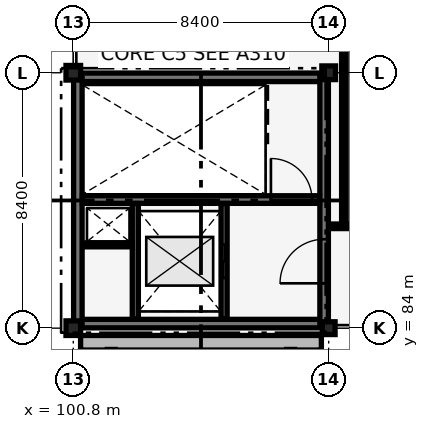
"""IFC4 building model, lengths in metres.
Left out: names, types, materials, properties, quantities, classifications, styles, units other than length and angle.
Written with IfcOpenShell. Run it as: python <this file> out.ifc"""

import sys

from ifc_helpers import new_model, si_unit, direction, frame, frame_2d, origin, origin_2d, place, context, subcontext, project, spatial, rectangle, extrude, element, fill, save


model = new_model("IFC4")
c1 = context("Model", 3, precision=1e-05, world=origin(), true_north=direction((0.0, 1.0)))
c2 = subcontext(c1, "Body", "Model", "MODEL_VIEW")
j1 = project(units=[si_unit("LENGTHUNIT", "METRE"), si_unit("PLANEANGLEUNIT", "RADIAN")], contexts=[c1])
p1 = place(None, origin())
s1 = spatial("IfcSite", under=j1, at=p1, CompositionType="ELEMENT")
p2 = place(p1, origin())
s2 = spatial("IfcBuilding", under=s1, at=p2, CompositionType="ELEMENT")
p3 = place(p2, frame((0.0, 0.0, 18.02)))
s3 = spatial("IfcBuildingStorey", under=s2, at=p3, CompositionType="ELEMENT", Elevation=18.02)
for number, where, z_axis, x_axis in (
    (1, (100.95, 84.15, 0.0), (0.0, 0.0, 1.0), (1.0, 0.0, 0.0)),
    (2, (100.95, 92.25, 0.0), (0.0, 0.0, 1.0), (1.0, 0.0, 0.0)),
    (3, (100.95, 84.15, 0.0), (0.0, 0.0, 1.0), (0.0, 1.0, 0.0)),
):
    element("IfcWall", number, at=place(p3, frame(where, z_axis=z_axis, x_axis=x_axis)), inside=s3, PredefinedType="SHEAR", context=c2, shape_type="SweptSolid", body=[
        extrude(rectangle(XDim=8.1, YDim=0.28, at=frame_2d((4.05, 0.0))), origin(), (0.0, 0.0, 1.0), 3.78),
    ])
p4 = place(p3, frame((109.05, 84.15, 0.0), z_axis=(0.0, 0.0, 1.0), x_axis=(0.0, 1.0, 0.0)))
e4 = element("IfcWall", 4, at=p4, inside=s3, PredefinedType="SHEAR", context=c2, shape_type="SweptSolid", body=[
    extrude(rectangle(XDim=8.1, YDim=0.28, at=frame_2d((4.05, 0.0))), origin(), (0.0, 0.0, 1.0), 3.78),
])
p5 = place(p4, frame((1.325, 0.0, 0.0)))
e5 = element("IfcOpeningElement", 5, at=p5, cuts=e4, PredefinedType="OPENING", context=c2, shape_type="SweptSolid", body=[
    extrude(rectangle(XDim=1.45, YDim=2.15, at=frame_2d((0.725, 1.075))), frame((0.0, 0.15, 0.0), z_axis=(0.0, -1.0, 0.0), x_axis=(1.0, 0.0, 0.0)), (0.0, 0.0, 1.0), 0.3),
])
p6 = place(p3, frame((101.1, 88.23, 0.0), z_axis=(0.0, 0.0, 1.0), x_axis=(1.0, 0.0, 0.0)))
e6 = element("IfcWall", 6, at=p6, inside=s3, PredefinedType="SHEAR", context=c2, shape_type="SweptSolid", body=[
    extrude(rectangle(XDim=7.8, YDim=0.25, at=frame_2d((3.9, 0.0))), origin(), (0.0, 0.0, 1.0), 3.78),
])
p7 = place(p6, frame((6.2, 0.0, 0.0)))
e7 = element("IfcOpeningElement", 7, at=p7, cuts=e6, PredefinedType="OPENING", context=c2, shape_type="SweptSolid", body=[
    extrude(rectangle(XDim=1.35, YDim=2.15, at=frame_2d((0.675, 1.075))), frame((0.0, 0.135, 0.0), z_axis=(0.0, -1.0, 0.0), x_axis=(1.0, 0.0, 0.0)), (0.0, 0.0, 1.0), 0.27),
])
for number, where, z_axis, x_axis in (
    (8, (100.8, 84.0, 0.0), (0.0, 0.0, 1.0), (1.0, 0.0, 0.0)),
    (9, (100.8, 92.4, 0.0), (0.0, 0.0, 1.0), (1.0, 0.0, 0.0)),
):
    element("IfcColumn", number, at=place(p3, frame(where, z_axis=z_axis, x_axis=x_axis)), inside=s3, PredefinedType="COLUMN", context=c2, shape_type="SweptSolid", body=[
        extrude(rectangle(XDim=0.48, YDim=0.48, at=origin_2d()), origin(), (0.0, 0.0, 1.0), 3.78),
    ])
p8 = place(p3, frame((109.2, 84.0, 0.0), z_axis=(0.0, 0.0, 1.0), x_axis=(1.0, 0.0, 0.0)))
e10 = element("IfcColumn", 10, at=p8, inside=s3, PredefinedType="COLUMN", context=c2, shape_type="SweptSolid", body=[
    extrude(rectangle(XDim=0.42, YDim=0.42, at=origin_2d()), origin(), (0.0, 0.0, 1.0), 3.78),
])
p9 = place(p3, frame((109.2, 92.4, 0.0), z_axis=(0.0, 0.0, 1.0), x_axis=(1.0, 0.0, 0.0)))
e11 = element("IfcColumn", 11, at=p9, inside=s3, PredefinedType="COLUMN", context=c2, shape_type="SweptSolid", body=[
    extrude(rectangle(XDim=0.45, YDim=0.45, at=origin_2d()), origin(), (0.0, 0.0, 1.0), 3.78),
])
p10 = place(p3, frame((101.04, 83.52, 0.0), z_axis=(0.0, 0.0, 1.0), x_axis=(1.0, 0.0, 0.0)))
e12 = element("IfcWall", 12, at=p10, inside=s3, PredefinedType="SOLIDWALL", context=c2, shape_type="SweptSolid", body=[
    extrude(rectangle(XDim=7.92, YDim=0.48, at=frame_2d((3.96, 0.0))), origin(), (0.0, 0.0, 1.0), 4.08),
])
p11 = place(p3, frame((105.76, 84.3, 0.0), z_axis=(0.0, 0.0, 1.0), x_axis=(0.0, 1.0, 0.0)))
e13 = element("IfcWall", 13, at=p11, inside=s3, PredefinedType="SHEAR", context=c2, shape_type="SweptSolid", body=[
    extrude(rectangle(XDim=3.8, YDim=0.2, at=frame_2d((1.9, 0.0))), origin(), (0.0, 0.0, 1.0), 3.78),
])
p12 = place(p11, frame((1.35, 0.0, 0.0)))
e14 = element("IfcOpeningElement", 14, at=p12, cuts=e13, PredefinedType="OPENING", context=c2, shape_type="SweptSolid", body=[
    extrude(rectangle(XDim=1.1, YDim=2.15, at=frame_2d((0.55, 1.075))), frame((0.0, 0.11, 0.0), z_axis=(0.0, -1.0, 0.0), x_axis=(1.0, 0.0, 0.0)), (0.0, 0.0, 1.0), 0.22),
])
p13 = place(p3, frame((102.84, 84.3, 0.0), z_axis=(0.0, 0.0, 1.0), x_axis=(0.0, 1.0, 0.0)))
e15 = element("IfcWall", 15, at=p13, inside=s3, PredefinedType="SHEAR", context=c2, shape_type="SweptSolid", body=[
    extrude(rectangle(XDim=3.8, YDim=0.2, at=frame_2d((1.9, 0.0))), origin(), (0.0, 0.0, 1.0), 3.78),
])
p14 = place(p3, frame((101.12, 86.74, 0.0), z_axis=(0.0, 0.0, 1.0), x_axis=(1.0, 0.0, 0.0)))
e16 = element("IfcWall", 16, at=p14, inside=s3, PredefinedType="PARTITIONING", context=c2, shape_type="SweptSolid", body=[
    extrude(rectangle(XDim=1.62, YDim=0.13, at=frame_2d((0.81, 0.0))), origin(), (0.0, 0.0, 1.0), 3.78),
])
p15 = place(p3, frame((109.23, 87.35, 0.0), z_axis=(0.0, 0.0, 1.0), x_axis=(1.0, 0.0, 0.0)))
e17 = element("IfcWall", 17, at=p15, inside=s3, PredefinedType="PARTITIONING", context=c2, shape_type="SweptSolid", body=[
    extrude(rectangle(XDim=16.74, YDim=0.15, at=frame_2d((8.37, 0.0))), origin(), (0.0, 0.0, 1.0), 3.18),
])
p16 = place(p15, frame((7.845, 0.0, 0.0)))
e18 = element("IfcOpeningElement", 18, at=p16, cuts=e17, PredefinedType="OPENING", context=c2, shape_type="SweptSolid", body=[
    extrude(rectangle(XDim=1.05, YDim=2.15, at=frame_2d((0.525, 1.075))), frame((0.0, 0.085, 0.0), z_axis=(0.0, -1.0, 0.0), x_axis=(1.0, 0.0, 0.0)), (0.0, 0.0, 1.0), 0.17),
])
p17 = place(p3, frame((109.7, 87.5, 0.0), z_axis=(0.0, 0.0, 1.0), x_axis=(0.0, 1.0, 0.0)))
e19 = element("IfcWall", 19, at=p17, inside=s3, PredefinedType="PARTITIONING", context=c2, shape_type="SweptSolid", body=[
    extrude(rectangle(XDim=29.82, YDim=0.15, at=frame_2d((14.91, 0.0))), origin(), (0.0, 0.0, 1.0), 3.78),
])
p18 = place(p7, origin())
e20 = element("IfcDoor", 20, at=p18, inside=s3, OperationType="SINGLE_SWING_LEFT", PredefinedType="DOOR", context=c2, shape_type="SweptSolid", body=[
    extrude(rectangle(XDim=1.35, YDim=2.15, at=frame_2d((0.675, 1.075))), frame((0.0, 0.025, 0.0), z_axis=(0.0, -1.0, 0.0), x_axis=(1.0, 0.0, 0.0)), (0.0, 0.0, 1.0), 0.05),
])
fill(e7, e20)
p19 = place(p12, origin())
e21 = element("IfcDoor", 21, at=p19, inside=s3, OperationType="SLIDING_TO_LEFT", PredefinedType="DOOR", context=c2, shape_type="SweptSolid", body=[
    extrude(rectangle(XDim=1.1, YDim=2.15, at=frame_2d((0.55, 1.075))), frame((0.0, 0.025, 0.0), z_axis=(0.0, -1.0, 0.0), x_axis=(1.0, 0.0, 0.0)), (0.0, 0.0, 1.0), 0.05),
])
fill(e14, e21)
p20 = place(p5, origin())
e22 = element("IfcDoor", 22, at=p20, inside=s3, OperationType="DOUBLE_DOOR_SINGLE_SWING", PredefinedType="DOOR", context=c2, shape_type="SweptSolid", body=[
    extrude(rectangle(XDim=1.45, YDim=2.15, at=frame_2d((0.725, 1.075))), frame((0.0, 0.025, 0.0), z_axis=(0.0, -1.0, 0.0), x_axis=(1.0, 0.0, 0.0)), (0.0, 0.0, 1.0), 0.05),
])
fill(e5, e22)
save(model, sys.argv[1])
